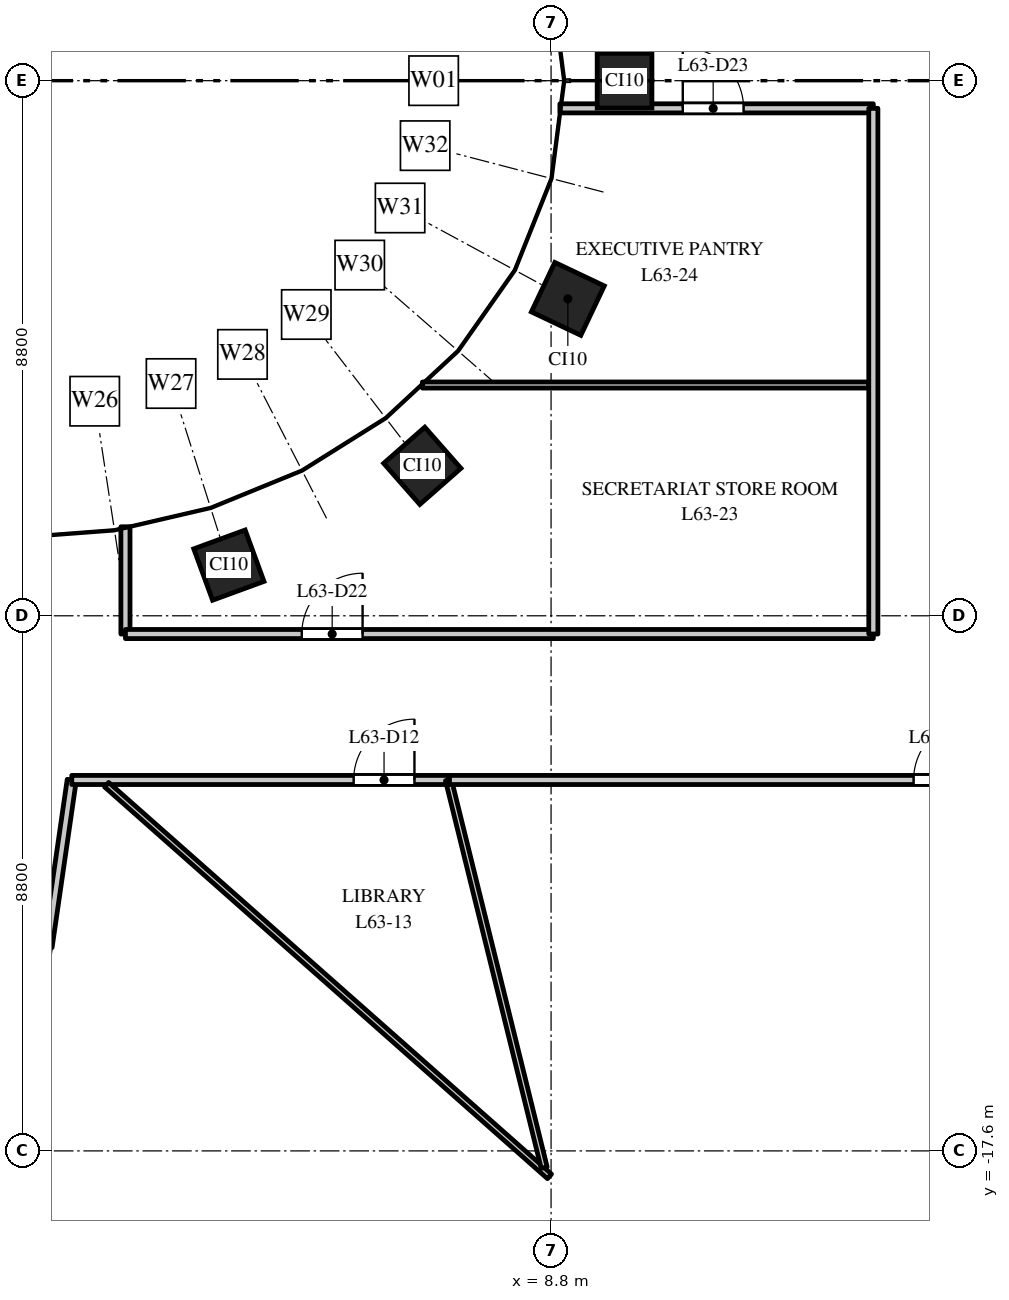
"""IFC4 building model, lengths in metres.
Left out: names, types, materials, properties, quantities, classifications, styles, units other than length and angle.
Written with IfcOpenShell. Run it as: python <this file> out.ifc"""

import sys

from ifc_helpers import new_model, si_unit, direction, frame, frame_2d, origin, origin_2d, place, context, subcontext, project, spatial, rectangle, extrude, element, fill, save


model = new_model("IFC4")
c1 = context("Model", 3, precision=1e-05, world=origin(), true_north=direction((0.0, 1.0)))
c2 = subcontext(c1, "Body", "Model", "MODEL_VIEW")
j1 = project(units=[si_unit("LENGTHUNIT", "METRE"), si_unit("PLANEANGLEUNIT", "RADIAN")], contexts=[c1])
p1 = place(None, origin())
s1 = spatial("IfcSite", under=j1, at=p1, CompositionType="ELEMENT")
p2 = place(p1, origin())
s2 = spatial("IfcBuilding", under=s1, at=p2, CompositionType="ELEMENT")
p3 = place(p2, frame((0.0, 0.0, 295.0)))
s3 = spatial("IfcBuildingStorey", under=s2, at=p3, CompositionType="ELEMENT", Elevation=295.0)
for number, where, z_axis, x_axis in (
    (1, (10.008, 0.0, 0.0), (0.0, 0.0, 1.0), (0.0, 1.0, 0.0)),
    (2, (3.501, -7.967, 0.0), (0.0, 0.0, 1.0), (0.939, 0.344, 0.0)),
    (3, (6.682, -6.334, 0.0), (0.0, 0.0, 1.0), (0.751, 0.66, 0.0)),
    (4, (9.076, -3.588, 0.0), (0.0, 0.0, 1.0), (0.429, 0.903, 0.0)),
):
    element("IfcColumn", number, at=place(p3, frame(where, z_axis=z_axis, x_axis=x_axis)), inside=s3, PredefinedType="COLUMN", context=c2, shape_type="SweptSolid", body=[
        extrude(rectangle(XDim=0.9, YDim=0.9, at=origin_2d()), origin(), (0.0, 0.0, 1.0), 4.0),
    ])
p4 = place(p3, frame((0.02, -17.984, 0.0), z_axis=(0.0, 0.0, 1.0), x_axis=(0.143001630517, -0.989722452847, 0.0)))
e5 = element("IfcWall", 5, at=p4, inside=s3, PredefinedType="PARTITIONING", context=c2, shape_type="SweptSolid", body=[
    extrude(rectangle(XDim=10.013, YDim=0.1, at=frame_2d((5.007, 0.0))), origin(), (0.0, 0.0, 1.0), 3.0),
])
p5 = place(p3, frame((0.519, -14.246, 0.0), z_axis=(0.0, 0.0, 1.0), x_axis=(0.14341658309, 0.989662408953, 0.0)))
e6 = element("IfcWall", 6, at=p5, inside=s3, PredefinedType="PARTITIONING", context=c2, shape_type="SweptSolid", body=[
    extrude(rectangle(XDim=2.775, YDim=0.15, at=frame_2d((1.387, 0.0))), origin(), (0.0, 0.0, 1.0), 3.7),
])
p6 = place(p3, frame((0.917, -11.5, 0.0), z_axis=(0.0, 0.0, 1.0), x_axis=(1.0, 0.0, 0.0)))
e7 = element("IfcWall", 7, at=p6, inside=s3, PredefinedType="PARTITIONING", context=c2, shape_type="SweptSolid", body=[
    extrude(rectangle(XDim=6.195, YDim=0.15, at=frame_2d((3.098, 0.0))), origin(), (0.0, 0.0, 1.0), 2.85),
])
p7 = place(p6, frame((4.636, 0.0, 0.0)))
e8 = element("IfcOpeningElement", 8, at=p7, cuts=e7, PredefinedType="OPENING", context=c2, shape_type="SweptSolid", body=[
    extrude(rectangle(XDim=1.0, YDim=2.1, at=frame_2d((0.5, 1.05))), frame((0.0, 0.085, 0.0), z_axis=(0.0, -1.0, 0.0), x_axis=(1.0, 0.0, 0.0)), (0.0, 0.0, 1.0), 0.17),
])
p8 = place(p3, frame((1.491, -11.578, 0.0), z_axis=(0.0, 0.0, 1.0), x_axis=(0.749070847305, -0.662489898577, 0.0)))
e9 = element("IfcWall", 9, at=p8, inside=s3, PredefinedType="PARTITIONING", context=c2, shape_type="SweptSolid", body=[
    extrude(rectangle(XDim=9.723, YDim=0.1, at=frame_2d((4.861, 0.0))), origin(), (0.0, 0.0, 1.0), 2.85),
])
p9 = place(p3, frame((1.8, -9.1, 0.0), z_axis=(0.0, 0.0, 1.0), x_axis=(0.0, 1.0, 0.0)))
e10 = element("IfcWall", 10, at=p9, inside=s3, PredefinedType="PARTITIONING", context=c2, shape_type="SweptSolid", body=[
    extrude(rectangle(XDim=1.764, YDim=0.15, at=frame_2d((0.882, 0.0))), origin(), (0.0, 0.0, 1.0), 3.0),
])
p10 = place(p3, frame((1.8, -9.1, 0.0), z_axis=(0.0, 0.0, 1.0), x_axis=(1.0, 0.0, 0.0)))
e11 = element("IfcWall", 11, at=p10, inside=s3, PredefinedType="PARTITIONING", context=c2, shape_type="SweptSolid", body=[
    extrude(rectangle(XDim=12.3, YDim=0.15, at=frame_2d((6.15, 0.0))), origin(), (0.0, 0.0, 1.0), 2.85),
])
p11 = place(p10, frame((2.9, 0.0, 0.0)))
e12 = element("IfcOpeningElement", 12, at=p11, cuts=e11, PredefinedType="OPENING", context=c2, shape_type="SweptSolid", body=[
    extrude(rectangle(XDim=1.0, YDim=2.1, at=frame_2d((0.5, 1.05))), frame((0.0, 0.085, 0.0), z_axis=(0.0, -1.0, 0.0), x_axis=(1.0, 0.0, 0.0)), (0.0, 0.0, 1.0), 0.17),
])
p12 = place(p3, frame((6.684, -5.005, 0.0), z_axis=(0.0, 0.0, 1.0), x_axis=(1.0, 0.0, 0.0)))
e13 = element("IfcWall", 13, at=p12, inside=s3, PredefinedType="PARTITIONING", context=c2, shape_type="SweptSolid", body=[
    extrude(rectangle(XDim=7.341, YDim=0.1, at=frame_2d((3.67, 0.0))), origin(), (0.0, 0.0, 1.0), 2.75),
])
p13 = place(p3, frame((7.112, -11.5, 0.0), z_axis=(0.0, 0.0, 1.0), x_axis=(0.23980569949, -0.970820903407, 0.0)))
e14 = element("IfcWall", 14, at=p13, inside=s3, PredefinedType="PARTITIONING", context=c2, shape_type="SweptSolid", body=[
    extrude(rectangle(XDim=6.568, YDim=0.1, at=frame_2d((3.284, 0.0))), origin(), (0.0, 0.0, 1.0), 2.85),
])
p14 = place(p3, frame((7.129, -11.5, 0.0), z_axis=(0.0, 0.0, 1.0), x_axis=(1.0, 0.0, 0.0)))
e15 = element("IfcWall", 15, at=p14, inside=s3, PredefinedType="PARTITIONING", context=c2, shape_type="SweptSolid", body=[
    extrude(rectangle(XDim=24.371, YDim=0.15, at=frame_2d((12.186, 0.0))), origin(), (0.0, 0.0, 1.0), 2.75),
])
p15 = place(p14, frame((7.633, 0.0, 0.0)))
e16 = element("IfcOpeningElement", 16, at=p15, cuts=e15, PredefinedType="OPENING", context=c2, shape_type="SweptSolid", body=[
    extrude(rectangle(XDim=1.0, YDim=2.1, at=frame_2d((0.5, 1.05))), frame((0.0, 0.085, 0.0), z_axis=(0.0, -1.0, 0.0), x_axis=(1.0, 0.0, 0.0)), (0.0, 0.0, 1.0), 0.17),
])
p16 = place(p14, frame((10.195, 0.0, 0.0)))
e17 = element("IfcOpeningElement", 17, at=p16, cuts=e15, PredefinedType="OPENING", context=c2, shape_type="SweptSolid", body=[
    extrude(rectangle(XDim=1.0, YDim=2.1, at=frame_2d((0.5, 1.05))), frame((0.0, 0.085, 0.0), z_axis=(0.0, -1.0, 0.0), x_axis=(1.0, 0.0, 0.0)), (0.0, 0.0, 1.0), 0.17),
])
p17 = place(p3, frame((8.945, -0.455, 0.0), z_axis=(0.0, 0.0, 1.0), x_axis=(1.0, 0.0, 0.0)))
e18 = element("IfcWall", 18, at=p17, inside=s3, PredefinedType="PARTITIONING", context=c2, shape_type="SweptSolid", body=[
    extrude(rectangle(XDim=5.155, YDim=0.15, at=frame_2d((2.578, 0.0))), origin(), (0.0, 0.0, 1.0), 3.0),
])
p18 = place(p17, frame((2.021, 0.0, 0.0)))
e19 = element("IfcOpeningElement", 19, at=p18, cuts=e18, PredefinedType="OPENING", context=c2, shape_type="SweptSolid", body=[
    extrude(rectangle(XDim=1.0, YDim=2.1, at=frame_2d((0.5, 1.05))), frame((0.0, 0.085, 0.0), z_axis=(0.0, -1.0, 0.0), x_axis=(1.0, 0.0, 0.0)), (0.0, 0.0, 1.0), 0.17),
])
p19 = place(p3, frame((14.1, -9.1, 0.0), z_axis=(0.0, 0.0, 1.0), x_axis=(0.0, 1.0, 0.0)))
e20 = element("IfcWall", 20, at=p19, inside=s3, PredefinedType="PARTITIONING", context=c2, shape_type="SweptSolid", body=[
    extrude(rectangle(XDim=8.645, YDim=0.15, at=frame_2d((4.323, 0.0))), origin(), (0.0, 0.0, 1.0), 2.75),
])
p20 = place(p7, origin())
e21 = element("IfcDoor", 21, at=p20, inside=s3, OperationType="SINGLE_SWING_RIGHT", PredefinedType="DOOR", context=c2, shape_type="SweptSolid", body=[
    extrude(rectangle(XDim=1.0, YDim=2.1, at=frame_2d((0.5, 1.05))), frame((0.0, 0.025, 0.0), z_axis=(0.0, -1.0, 0.0), x_axis=(1.0, 0.0, 0.0)), (0.0, 0.0, 1.0), 0.05),
])
fill(e8, e21)
p21 = place(p15, origin())
e22 = element("IfcDoor", 22, at=p21, inside=s3, OperationType="SINGLE_SWING_RIGHT", PredefinedType="DOOR", context=c2, shape_type="SweptSolid", body=[
    extrude(rectangle(XDim=1.0, YDim=2.1, at=frame_2d((0.5, 1.05))), frame((0.0, 0.025, 0.0), z_axis=(0.0, -1.0, 0.0), x_axis=(1.0, 0.0, 0.0)), (0.0, 0.0, 1.0), 0.05),
])
fill(e16, e22)
p22 = place(p11, origin())
e23 = element("IfcDoor", 23, at=p22, inside=s3, OperationType="SINGLE_SWING_RIGHT", PredefinedType="DOOR", context=c2, shape_type="SweptSolid", body=[
    extrude(rectangle(XDim=1.0, YDim=2.1, at=frame_2d((0.5, 1.05))), frame((0.0, 0.025, 0.0), z_axis=(0.0, -1.0, 0.0), x_axis=(1.0, 0.0, 0.0)), (0.0, 0.0, 1.0), 0.05),
])
fill(e12, e23)
p23 = place(p18, origin())
e24 = element("IfcDoor", 24, at=p23, inside=s3, OperationType="SINGLE_SWING_LEFT", PredefinedType="DOOR", context=c2, shape_type="SweptSolid", body=[
    extrude(rectangle(XDim=1.0, YDim=2.1, at=frame_2d((0.5, 1.05))), frame((0.0, 0.025, 0.0), z_axis=(0.0, -1.0, 0.0), x_axis=(1.0, 0.0, 0.0)), (0.0, 0.0, 1.0), 0.05),
])
fill(e19, e24)
save(model, sys.argv[1])
